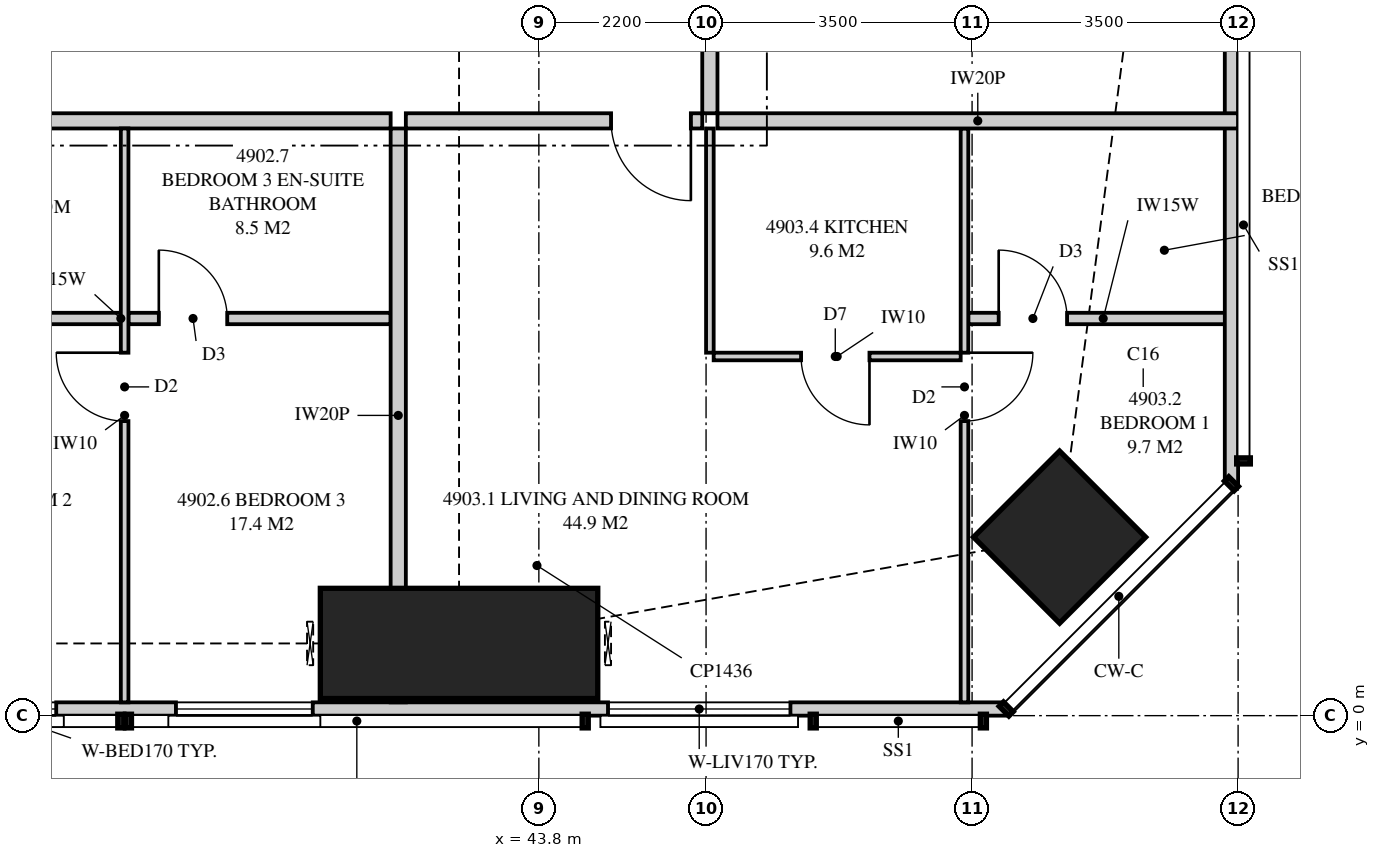
"""IFC4 building model, lengths in metres.
Left out: names, types, materials, properties, quantities, classifications, styles, units other than length and angle.
Written with IfcOpenShell. Run it as: python <this file> out.ifc"""

import sys

from ifc_helpers import new_model, si_unit, direction, frame, frame_2d, origin, origin_2d, place, context, subcontext, project, spatial, polyline, rectangle, outline, extrude, element, fill, save


model = new_model("IFC4")
c1 = context("Model", 3, precision=1e-05, world=origin(), true_north=direction((0.0, 1.0)))
c2 = subcontext(c1, "Body", "Model", "MODEL_VIEW")
j1 = project(units=[si_unit("LENGTHUNIT", "METRE"), si_unit("PLANEANGLEUNIT", "RADIAN")], contexts=[c1])
p1 = place(None, origin())
s1 = spatial("IfcSite", under=j1, at=p1, CompositionType="ELEMENT")
p2 = place(p1, origin())
s2 = spatial("IfcBuilding", under=s1, at=p2, CompositionType="ELEMENT")
p3 = place(p2, frame((0.0, 0.0, 181.15)))
s3 = spatial("IfcBuildingStorey", under=s2, at=p3, CompositionType="ELEMENT", Elevation=181.15)
p4 = place(p3, frame((42.75, 0.95, 0.0), z_axis=(0.0, 0.0, 1.0), x_axis=(0.0, 1.0, 0.0)))
e1 = element("IfcColumn", 1, at=p4, inside=s3, PredefinedType="COLUMN", context=c2, shape_type="SweptSolid", body=[
    extrude(rectangle(XDim=1.45, YDim=3.65, at=origin_2d()), origin(), (0.0, 0.0, 1.0), 3.35),
])
p5 = place(p3, frame((50.652, 2.348, 0.0), z_axis=(0.0, 0.0, 1.0), x_axis=(0.707106781187, 0.707106781187, 0.0)))
e2 = element("IfcColumn", 2, at=p5, inside=s3, PredefinedType="COLUMN", context=c2, shape_type="SweptSolid", body=[
    extrude(rectangle(XDim=1.6, YDim=1.6, at=origin_2d()), origin(), (0.0, 0.0, 1.0), 3.35),
])
p6 = place(p3, frame((15.051, 0.087, 0.0), z_axis=(0.0, 0.0, 1.0), x_axis=(1.0, 0.0, 0.0)))
e3 = element("IfcWall", 3, at=p6, inside=s3, PredefinedType="SOLIDWALL", context=c2, shape_type="SweptSolid", body=[
    extrude(outline(polyline([(0.0, 0.0), (34.897, 0.0), (34.897, 3.11), (27.91, 3.11), (27.91, 2.15), (27.836, 2.15), (27.836, 3.11), (27.699, 3.11), (27.699, 2.15), (7.199, 2.15), (7.199, 3.11), (7.062, 3.11), (7.062, 2.15), (6.987, 2.15), (6.987, 3.11), (0.0, 3.11), (0.0, 0.0)])), frame((0.0, 0.087, 0.0), z_axis=(0.0, -1.0, 0.0), x_axis=(1.0, 0.0, 0.0)), (0.0, 0.0, 1.0), 0.175),
])
p7 = place(p6, frame((2.849, 0.0, 0.4)))
e4 = element("IfcOpeningElement", 4, at=p7, cuts=e3, PredefinedType="OPENING", context=c2, shape_type="SweptSolid", body=[
    extrude(rectangle(XDim=2.4, YDim=1.7, at=frame_2d((1.2, 0.85))), frame((0.0, 0.097, 0.0), z_axis=(0.0, -1.0, 0.0), x_axis=(1.0, 0.0, 0.0)), (0.0, 0.0, 1.0), 0.195),
])
p8 = place(p6, frame((9.449, 0.0, 0.4)))
e5 = element("IfcOpeningElement", 5, at=p8, cuts=e3, PredefinedType="OPENING", context=c2, shape_type="SweptSolid", body=[
    extrude(rectangle(XDim=1.8, YDim=1.7, at=frame_2d((0.9, 0.85))), frame((0.0, 0.097, 0.0), z_axis=(0.0, -1.0, 0.0), x_axis=(1.0, 0.0, 0.0)), (0.0, 0.0, 1.0), 0.195),
])
p9 = place(p6, frame((13.561, 0.0, 0.0)))
e6 = element("IfcOpeningElement", 6, at=p9, cuts=e3, PredefinedType="OPENING", context=c2, shape_type="SweptSolid", body=[
    extrude(rectangle(XDim=1.8, YDim=2.1, at=frame_2d((0.9, 1.05))), frame((0.0, 0.097, 0.0), z_axis=(0.0, -1.0, 0.0), x_axis=(1.0, 0.0, 0.0)), (0.0, 0.0, 1.0), 0.195),
])
p10 = place(p6, frame((20.599, 0.0, 0.4)))
e7 = element("IfcOpeningElement", 7, at=p10, cuts=e3, PredefinedType="OPENING", context=c2, shape_type="SweptSolid", body=[
    extrude(rectangle(XDim=1.8, YDim=1.7, at=frame_2d((0.9, 0.85))), frame((0.0, 0.097, 0.0), z_axis=(0.0, -1.0, 0.0), x_axis=(1.0, 0.0, 0.0)), (0.0, 0.0, 1.0), 0.195),
])
p11 = place(p6, frame((23.974, 0.0, 0.4)))
e8 = element("IfcOpeningElement", 8, at=p11, cuts=e3, PredefinedType="OPENING", context=c2, shape_type="SweptSolid", body=[
    extrude(rectangle(XDim=1.8, YDim=1.7, at=frame_2d((0.9, 0.85))), frame((0.0, 0.097, 0.0), z_axis=(0.0, -1.0, 0.0), x_axis=(1.0, 0.0, 0.0)), (0.0, 0.0, 1.0), 0.195),
])
p12 = place(p6, frame((29.659, 0.0, 0.4)))
e9 = element("IfcOpeningElement", 9, at=p12, cuts=e3, PredefinedType="OPENING", context=c2, shape_type="SweptSolid", body=[
    extrude(rectangle(XDim=2.4, YDim=1.7, at=frame_2d((1.2, 0.85))), frame((0.0, 0.097, 0.0), z_axis=(0.0, -1.0, 0.0), x_axis=(1.0, 0.0, 0.0)), (0.0, 0.0, 1.0), 0.195),
])
p13 = place(p3, frame((52.913, 3.051, 0.0), z_axis=(0.0, 0.0, 1.0), x_axis=(0.0, 1.0, 0.0)))
e10 = element("IfcWall", 10, at=p13, inside=s3, PredefinedType="SOLIDWALL", context=c2, shape_type="SweptSolid", body=[
    extrude(outline(polyline([(0.0, 0.0), (29.897, 0.0), (29.897, 3.11), (22.167, 3.11), (22.167, 2.15), (22.074, 2.15), (22.074, 3.11), (21.949, 3.11), (21.949, 2.15), (9.949, 2.15), (9.949, 3.11), (9.847, 3.11), (9.847, 2.15), (9.706, 2.15), (9.706, 3.11), (0.0, 3.11), (0.0, 0.0)])), frame((0.0, 0.087, 0.0), z_axis=(0.0, -1.0, 0.0), x_axis=(1.0, 0.0, 0.0)), (0.0, 0.0, 1.0), 0.175),
])
p14 = place(p13, frame((6.808, 0.0, 0.4)))
e11 = element("IfcOpeningElement", 11, at=p14, cuts=e10, PredefinedType="OPENING", context=c2, shape_type="SweptSolid", body=[
    extrude(rectangle(XDim=1.2, YDim=1.7, at=frame_2d((0.6, 0.85))), frame((0.0, 0.097, 0.0), z_axis=(0.0, -1.0, 0.0), x_axis=(1.0, 0.0, 0.0)), (0.0, 0.0, 1.0), 0.195),
])
p15 = place(p13, frame((12.424, 0.0, 0.4)))
e12 = element("IfcOpeningElement", 12, at=p15, cuts=e10, PredefinedType="OPENING", context=c2, shape_type="SweptSolid", body=[
    extrude(rectangle(XDim=1.8, YDim=1.7, at=frame_2d((0.9, 0.85))), frame((0.0, 0.097, 0.0), z_axis=(0.0, -1.0, 0.0), x_axis=(1.0, 0.0, 0.0)), (0.0, 0.0, 1.0), 0.195),
])
p16 = place(p13, frame((15.324, 0.0, 0.0)))
e13 = element("IfcOpeningElement", 13, at=p16, cuts=e10, PredefinedType="OPENING", context=c2, shape_type="SweptSolid", body=[
    extrude(rectangle(XDim=1.8, YDim=2.1, at=frame_2d((0.9, 1.05))), frame((0.0, 0.097, 0.0), z_axis=(0.0, -1.0, 0.0), x_axis=(1.0, 0.0, 0.0)), (0.0, 0.0, 1.0), 0.195),
])
p17 = place(p13, frame((17.761, 0.0, 0.4)))
e14 = element("IfcOpeningElement", 14, at=p17, cuts=e10, PredefinedType="OPENING", context=c2, shape_type="SweptSolid", body=[
    extrude(rectangle(XDim=1.8, YDim=1.7, at=frame_2d((0.9, 0.85))), frame((0.0, 0.097, 0.0), z_axis=(0.0, -1.0, 0.0), x_axis=(1.0, 0.0, 0.0)), (0.0, 0.0, 1.0), 0.195),
])
p18 = place(p13, frame((23.874, 0.0, 0.4)))
e15 = element("IfcOpeningElement", 15, at=p18, cuts=e10, PredefinedType="OPENING", context=c2, shape_type="SweptSolid", body=[
    extrude(rectangle(XDim=1.8, YDim=1.7, at=frame_2d((0.9, 0.85))), frame((0.0, 0.097, 0.0), z_axis=(0.0, -1.0, 0.0), x_axis=(1.0, 0.0, 0.0)), (0.0, 0.0, 1.0), 0.195),
])
p19 = place(p13, frame((26.871, 0.0, 0.4)))
e16 = element("IfcOpeningElement", 16, at=p19, cuts=e10, PredefinedType="OPENING", context=c2, shape_type="SweptSolid", body=[
    extrude(rectangle(XDim=1.8, YDim=1.7, at=frame_2d((0.9, 0.85))), frame((0.0, 0.097, 0.0), z_axis=(0.0, -1.0, 0.0), x_axis=(1.0, 0.0, 0.0)), (0.0, 0.0, 1.0), 0.195),
])
p20 = place(p3, frame((41.95, 0.175, 0.0), z_axis=(0.0, 0.0, 1.0), x_axis=(0.0, 1.0, 0.0)))
e17 = element("IfcWall", 17, at=p20, inside=s3, PredefinedType="PARTITIONING", context=c2, shape_type="SweptSolid", body=[
    extrude(outline(polyline([(0.529, 2.15), (0.0, 2.15), (0.0, 0.0), (0.529, 0.0), (0.529, 0.746), (1.021, 0.746), (1.021, 0.0), (7.55, 0.0), (7.55, 3.11), (1.685, 3.11), (1.685, 2.15), (1.021, 2.15), (1.021, 1.404), (0.529, 1.404), (0.529, 2.15)])), frame((0.0, 0.1, 0.0), z_axis=(0.0, -1.0, 0.0), x_axis=(1.0, 0.0, 0.0)), (0.0, 0.0, 1.0), 0.2),
])
p21 = place(p3, frame((38.35, 0.175, 0.0), z_axis=(0.0, 0.0, 1.0), x_axis=(0.0, 1.0, 0.0)))
e18 = element("IfcWall", 18, at=p21, inside=s3, PredefinedType="PARTITIONING", context=c2, shape_type="SweptSolid", body=[
    extrude(outline(polyline([(0.0, 0.0), (7.55, 0.0), (7.55, 3.11), (1.635, 3.11), (1.635, 2.15), (0.0, 2.15), (0.0, 3.11), (0.0, 0.0)])), frame((0.0, 0.05, 0.0), z_axis=(0.0, -1.0, 0.0), x_axis=(1.0, 0.0, 0.0)), (0.0, 0.0, 1.0), 0.1),
])
p22 = place(p21, frame((3.7, 0.0, 0.0)))
e19 = element("IfcOpeningElement", 19, at=p22, cuts=e18, PredefinedType="OPENING", context=c2, shape_type="SweptSolid", body=[
    extrude(rectangle(XDim=0.9, YDim=2.1, at=frame_2d((0.45, 1.05))), frame((0.0, 0.06, 0.0), z_axis=(0.0, -1.0, 0.0), x_axis=(1.0, 0.0, 0.0)), (0.0, 0.0, 1.0), 0.12),
])
p23 = place(p3, frame((34.8, 5.225, 0.0), z_axis=(0.0, 0.0, 1.0), x_axis=(1.0, 0.0, 0.0)))
e20 = element("IfcWall", 20, at=p23, inside=s3, PredefinedType="PLUMBINGWALL", context=c2, shape_type="SweptSolid", body=[
    extrude(rectangle(XDim=3.5, YDim=0.15, at=frame_2d((1.75, 0.0))), origin(), (0.0, 0.0, 1.0), 3.11),
])
p24 = place(p3, frame((38.4, 5.225, 0.0), z_axis=(0.0, 0.0, 1.0), x_axis=(1.0, 0.0, 0.0)))
e21 = element("IfcWall", 21, at=p24, inside=s3, PredefinedType="PLUMBINGWALL", context=c2, shape_type="SweptSolid", body=[
    extrude(rectangle(XDim=3.45, YDim=0.15, at=frame_2d((1.725, 0.0))), origin(), (0.0, 0.0, 1.0), 3.11),
])
p25 = place(p24, frame((0.4, 0.0, 0.0)))
e22 = element("IfcOpeningElement", 22, at=p25, cuts=e21, PredefinedType="OPENING", context=c2, shape_type="SweptSolid", body=[
    extrude(rectangle(XDim=0.9, YDim=2.1, at=frame_2d((0.45, 1.05))), frame((0.0, 0.085, 0.0), z_axis=(0.0, -1.0, 0.0), x_axis=(1.0, 0.0, 0.0)), (0.0, 0.0, 1.0), 0.17),
])
p26 = place(p3, frame((42.05, 7.825, 0.0), z_axis=(0.0, 0.0, 1.0), x_axis=(1.0, 0.0, 0.0)))
e23 = element("IfcWall", 23, at=p26, inside=s3, PredefinedType="PARTITIONING", context=c2, shape_type="SweptSolid", body=[
    extrude(outline(polyline([(0.0, 0.0), (3.9, 0.0), (3.9, 3.11), (1.037, 3.11), (1.037, 2.541), (0.363, 2.541), (0.363, 3.11), (0.0, 3.11), (0.0, 0.0)])), frame((0.0, 0.1, 0.0), z_axis=(0.0, -1.0, 0.0), x_axis=(1.0, 0.0, 0.0)), (0.0, 0.0, 1.0), 0.2),
])
p27 = place(p26, frame((2.7, 0.0, 0.0)))
e24 = element("IfcOpeningElement", 24, at=p27, cuts=e23, PredefinedType="OPENING", context=c2, shape_type="SweptSolid", body=[
    extrude(rectangle(XDim=1.05, YDim=2.2, at=frame_2d((0.525, 1.1))), frame((0.0, 0.11, 0.0), z_axis=(0.0, -1.0, 0.0), x_axis=(1.0, 0.0, 0.0)), (0.0, 0.0, 1.0), 0.22),
])
p28 = place(p3, frame((49.4, 0.175, 0.0), z_axis=(0.0, 0.0, 1.0), x_axis=(0.0, 1.0, 0.0)))
e25 = element("IfcWall", 25, at=p28, inside=s3, PredefinedType="PARTITIONING", context=c2, shape_type="SweptSolid", body=[
    extrude(outline(polyline([(0.0, 0.0), (7.55, 0.0), (7.55, 3.11), (2.825, 3.11), (2.825, 2.15), (1.079, 2.15), (1.079, 3.11), (0.0, 3.11), (0.0, 0.0)])), frame((0.0, 0.05, 0.0), z_axis=(0.0, -1.0, 0.0), x_axis=(1.0, 0.0, 0.0)), (0.0, 0.0, 1.0), 0.1),
])
p29 = place(p28, frame((3.7, 0.0, 0.0)))
e26 = element("IfcOpeningElement", 26, at=p29, cuts=e25, PredefinedType="OPENING", context=c2, shape_type="SweptSolid", body=[
    extrude(rectangle(XDim=0.9, YDim=2.1, at=frame_2d((0.45, 1.05))), frame((0.0, 0.06, 0.0), z_axis=(0.0, -1.0, 0.0), x_axis=(1.0, 0.0, 0.0)), (0.0, 0.0, 1.0), 0.12),
])
p30 = place(p3, frame((49.45, 5.225, 0.0), z_axis=(0.0, 0.0, 1.0), x_axis=(1.0, 0.0, 0.0)))
e27 = element("IfcWall", 27, at=p30, inside=s3, PredefinedType="PLUMBINGWALL", context=c2, shape_type="SweptSolid", body=[
    extrude(outline(polyline([(0.0, 0.0), (3.55, 0.0), (3.55, 3.11), (2.472, 3.11), (2.472, 2.15), (0.687, 2.15), (0.687, 3.11), (0.0, 3.11), (0.0, 0.0)])), frame((0.0, 0.075, 0.0), z_axis=(0.0, -1.0, 0.0), x_axis=(1.0, 0.0, 0.0)), (0.0, 0.0, 1.0), 0.15),
])
p31 = place(p30, frame((0.4, 0.0, 0.0)))
e28 = element("IfcOpeningElement", 28, at=p31, cuts=e27, PredefinedType="OPENING", context=c2, shape_type="SweptSolid", body=[
    extrude(rectangle(XDim=0.9, YDim=2.1, at=frame_2d((0.45, 1.05))), frame((0.0, 0.085, 0.0), z_axis=(0.0, -1.0, 0.0), x_axis=(1.0, 0.0, 0.0)), (0.0, 0.0, 1.0), 0.17),
])
p32 = place(p3, frame((46.1, 4.725, 0.0), z_axis=(0.0, 0.0, 1.0), x_axis=(1.0, 0.0, 0.0)))
e29 = element("IfcWall", 29, at=p32, inside=s3, PredefinedType="PARTITIONING", context=c2, shape_type="SweptSolid", body=[
    extrude(rectangle(XDim=3.25, YDim=0.1, at=frame_2d((1.625, 0.0))), origin(), (0.0, 0.0, 1.0), 3.11),
])
p33 = place(p32, frame((1.15, 0.0, 0.0)))
e30 = element("IfcOpeningElement", 30, at=p33, cuts=e29, PredefinedType="OPENING", context=c2, shape_type="SweptSolid", body=[
    extrude(rectangle(XDim=0.9, YDim=2.1, at=frame_2d((0.45, 1.05))), frame((0.0, 0.06, 0.0), z_axis=(0.0, -1.0, 0.0), x_axis=(1.0, 0.0, 0.0)), (0.0, 0.0, 1.0), 0.12),
])
p34 = place(p3, frame((46.05, 4.775, 0.0), z_axis=(0.0, 0.0, 1.0), x_axis=(0.0, 1.0, 0.0)))
e31 = element("IfcWall", 31, at=p34, inside=s3, PredefinedType="PARTITIONING", context=c2, shape_type="SweptSolid", body=[
    extrude(rectangle(XDim=2.95, YDim=0.1, at=frame_2d((1.475, 0.0))), origin(), (0.0, 0.0, 1.0), 3.11),
])
p35 = place(p3, frame((46.15, 7.825, 0.0), z_axis=(0.0, 0.0, 1.0), x_axis=(1.0, 0.0, 0.0)))
e32 = element("IfcWall", 32, at=p35, inside=s3, PredefinedType="PARTITIONING", context=c2, shape_type="SweptSolid", body=[
    extrude(outline(polyline([(0.0, 0.0), (6.85, 0.0), (6.85, 3.11), (6.138, 3.11), (6.138, 2.15), (4.303, 2.15), (4.303, 3.11), (0.0, 3.11), (0.0, 0.0)])), frame((0.0, 0.1, 0.0), z_axis=(0.0, -1.0, 0.0), x_axis=(1.0, 0.0, 0.0)), (0.0, 0.0, 1.0), 0.2),
])
p36 = place(p3, frame((46.05, 7.925, 0.0), z_axis=(0.0, 0.0, 1.0), x_axis=(0.0, 1.0, 0.0)))
e33 = element("IfcWall", 33, at=p36, inside=s3, PredefinedType="PARTITIONING", context=c2, shape_type="SweptSolid", body=[
    extrude(rectangle(XDim=1.188, YDim=0.2, at=frame_2d((0.594, 0.0))), origin(), (0.0, 0.0, 1.0), 3.11),
])
p37 = place(p3, frame((34.175, 7.825, 0.0), z_axis=(0.0, 0.0, 1.0), x_axis=(1.0, 0.0, 0.0)))
e34 = element("IfcWall", 34, at=p37, inside=s3, PredefinedType="PARTITIONING", context=c2, shape_type="SweptSolid", body=[
    extrude(rectangle(XDim=7.675, YDim=0.2, at=frame_2d((3.837, 0.0))), origin(), (0.0, 0.0, 1.0), 3.11),
])
p38 = place(p10, origin())
e35 = element("IfcWindow", 35, at=p38, inside=s3, PartitioningType="SINGLE_PANEL", PredefinedType="WINDOW", context=c2, shape_type="SweptSolid", body=[
    extrude(rectangle(XDim=1.8, YDim=1.7, at=frame_2d((0.9, 0.85))), frame((0.0, 0.03, 0.0), z_axis=(0.0, -1.0, 0.0), x_axis=(1.0, 0.0, 0.0)), (0.0, 0.0, 1.0), 0.06),
])
fill(e7, e35)
p39 = place(p11, origin())
e36 = element("IfcWindow", 36, at=p39, inside=s3, PartitioningType="SINGLE_PANEL", PredefinedType="WINDOW", context=c2, shape_type="SweptSolid", body=[
    extrude(rectangle(XDim=1.8, YDim=1.7, at=frame_2d((0.9, 0.85))), frame((0.0, 0.03, 0.0), z_axis=(0.0, -1.0, 0.0), x_axis=(1.0, 0.0, 0.0)), (0.0, 0.0, 1.0), 0.06),
])
fill(e8, e36)
p40 = place(p12, origin())
e37 = element("IfcWindow", 37, at=p40, inside=s3, PartitioningType="SINGLE_PANEL", PredefinedType="WINDOW", context=c2, shape_type="SweptSolid", body=[
    extrude(rectangle(XDim=2.4, YDim=1.7, at=frame_2d((1.2, 0.85))), frame((0.0, 0.03, 0.0), z_axis=(0.0, -1.0, 0.0), x_axis=(1.0, 0.0, 0.0)), (0.0, 0.0, 1.0), 0.06),
])
fill(e9, e37)
p41 = place(p22, origin())
e38 = element("IfcDoor", 38, at=p41, inside=s3, OperationType="SINGLE_SWING_RIGHT", PredefinedType="DOOR", context=c2, shape_type="SweptSolid", body=[
    extrude(rectangle(XDim=0.9, YDim=2.1, at=frame_2d((0.45, 1.05))), frame((0.0, 0.025, 0.0), z_axis=(0.0, -1.0, 0.0), x_axis=(1.0, 0.0, 0.0)), (0.0, 0.0, 1.0), 0.05),
])
fill(e19, e38)
p42 = place(p25, origin())
e39 = element("IfcDoor", 39, at=p42, inside=s3, OperationType="SINGLE_SWING_LEFT", PredefinedType="DOOR", context=c2, shape_type="SweptSolid", body=[
    extrude(rectangle(XDim=0.9, YDim=2.1, at=frame_2d((0.45, 1.05))), frame((0.0, 0.025, 0.0), z_axis=(0.0, -1.0, 0.0), x_axis=(1.0, 0.0, 0.0)), (0.0, 0.0, 1.0), 0.05),
])
fill(e22, e39)
p43 = place(p27, frame((1.05, 0.0, 0.0), z_axis=(0.0, 0.0, 1.0), x_axis=(-1.0, 0.0, 0.0)))
e40 = element("IfcDoor", 40, at=p43, inside=s3, OperationType="SINGLE_SWING_LEFT", PredefinedType="DOOR", context=c2, shape_type="SweptSolid", body=[
    extrude(rectangle(XDim=1.05, YDim=2.2, at=frame_2d((0.525, 1.1))), frame((0.0, 0.025, 0.0), z_axis=(0.0, -1.0, 0.0), x_axis=(1.0, 0.0, 0.0)), (0.0, 0.0, 1.0), 0.05),
])
fill(e24, e40)
p44 = place(p29, frame((0.9, 0.0, 0.0), z_axis=(0.0, 0.0, 1.0), x_axis=(-1.0, 0.0, 0.0)))
e41 = element("IfcDoor", 41, at=p44, inside=s3, OperationType="SINGLE_SWING_LEFT", PredefinedType="DOOR", context=c2, shape_type="SweptSolid", body=[
    extrude(rectangle(XDim=0.9, YDim=2.1, at=frame_2d((0.45, 1.05))), frame((0.0, 0.025, 0.0), z_axis=(0.0, -1.0, 0.0), x_axis=(1.0, 0.0, 0.0)), (0.0, 0.0, 1.0), 0.05),
])
fill(e26, e41)
p45 = place(p31, origin())
e42 = element("IfcDoor", 42, at=p45, inside=s3, OperationType="SINGLE_SWING_LEFT", PredefinedType="DOOR", context=c2, shape_type="SweptSolid", body=[
    extrude(rectangle(XDim=0.9, YDim=2.1, at=frame_2d((0.45, 1.05))), frame((0.0, 0.025, 0.0), z_axis=(0.0, -1.0, 0.0), x_axis=(1.0, 0.0, 0.0)), (0.0, 0.0, 1.0), 0.05),
])
fill(e28, e42)
p46 = place(p33, frame((0.9, 0.0, 0.0), z_axis=(0.0, 0.0, 1.0), x_axis=(-1.0, 0.0, 0.0)))
e43 = element("IfcDoor", 43, at=p46, inside=s3, OperationType="SINGLE_SWING_LEFT", PredefinedType="DOOR", context=c2, shape_type="SweptSolid", body=[
    extrude(rectangle(XDim=0.9, YDim=2.1, at=frame_2d((0.45, 1.05))), frame((0.0, 0.025, 0.0), z_axis=(0.0, -1.0, 0.0), x_axis=(1.0, 0.0, 0.0)), (0.0, 0.0, 1.0), 0.05),
])
fill(e30, e43)
save(model, sys.argv[1])
